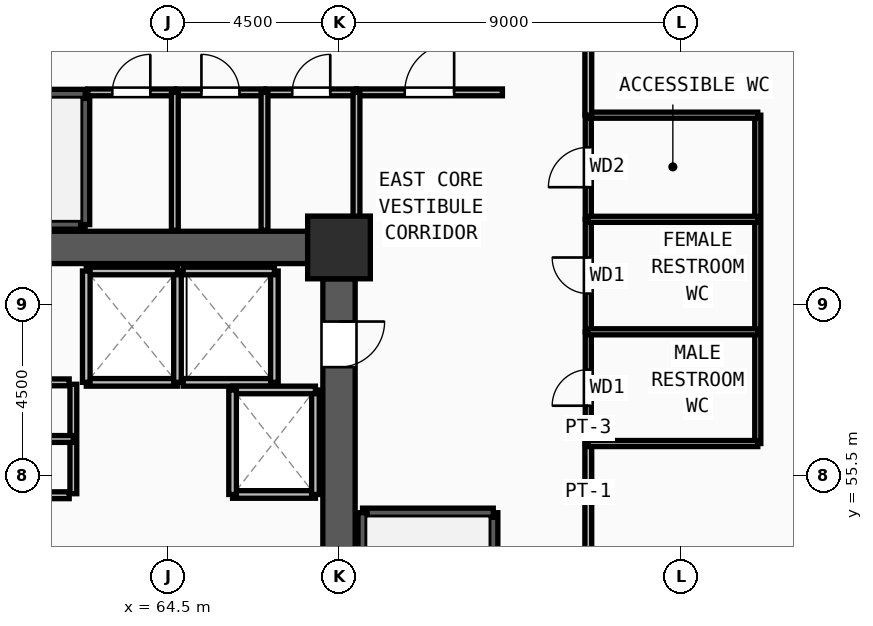
"""IFC4 building model, lengths in metres.
Left out: names, types, materials, properties, quantities, classifications, styles, units other than length and angle.
Written with IfcOpenShell. Run it as: python <this file> out.ifc"""

import sys

from ifc_helpers import new_model, si_unit, direction, frame, frame_2d, origin, origin_2d, place, context, subcontext, project, spatial, rectangle, extrude, source, transform, mapped, element, fill, save


model = new_model("IFC4")
c1 = context("Model", 3, precision=1e-05, world=origin(), true_north=direction((0.0, 1.0)))
c2 = subcontext(c1, "Body", "Model", "MODEL_VIEW")
j1 = project(units=[si_unit("LENGTHUNIT", "METRE"), si_unit("PLANEANGLEUNIT", "RADIAN")], contexts=[c1])
p1 = place(None, origin())
s1 = spatial("IfcSite", under=j1, at=p1, CompositionType="ELEMENT")
p2 = place(p1, origin())
s2 = spatial("IfcBuilding", under=s1, at=p2, CompositionType="ELEMENT")
p3 = place(p2, frame((0.0, 0.0, 39.75)))
s3 = spatial("IfcBuildingStorey", under=s2, at=p3, CompositionType="ELEMENT", Elevation=39.75)
m1 = source(origin(), c2, "Body", "SweptSolid", [
    extrude(rectangle(XDim=1.65, YDim=1.65, at=origin_2d()), origin(), (0.0, 0.0, 1.0), 3.75),
])
p4 = place(p3, frame((69.0, 61.5, 0.0), z_axis=(0.0, 0.0, 1.0), x_axis=(1.0, 0.0, 0.0)))
e1 = element("IfcColumn", 1, at=p4, inside=s3, PredefinedType="COLUMN", context=c2, shape_type="MappedRepresentation", body=[
    mapped(m1, transform((0.0, 0.0, 0.0), x_axis=(1.0, 0.0, 0.0), y_axis=(0.0, 1.0, 0.0), z_axis=(0.0, 0.0, 1.0), scale=1.0)),
])
p5 = place(p3, frame((60.825, 61.5, 0.0), z_axis=(0.0, 0.0, 1.0), x_axis=(1.0, 0.0, 0.0)))
e2 = element("IfcWall", 2, at=p5, inside=s3, PredefinedType="SHEAR", context=c2, shape_type="SweptSolid", body=[
    extrude(rectangle(XDim=7.35, YDim=0.85, at=frame_2d((3.675, 0.0))), origin(), (0.0, 0.0, 1.0), 3.57),
])
p6 = place(p3, frame((69.0, 60.675, 0.0), z_axis=(0.0, 0.0, 1.0), x_axis=(0.0, -1.0, 0.0)))
e3 = element("IfcWall", 3, at=p6, inside=s3, PredefinedType="SHEAR", context=c2, shape_type="SweptSolid", body=[
    extrude(rectangle(XDim=13.35, YDim=0.85, at=frame_2d((6.675, 0.0))), origin(), (0.0, 0.0, 1.0), 3.57),
])
m2 = source(origin(), c2, "Body", "SweptSolid", [
    extrude(rectangle(XDim=1.2, YDim=2.2, at=frame_2d((0.6, 1.1))), frame((0.0, 0.435, 0.0), z_axis=(0.0, -1.0, 0.0), x_axis=(1.0, 0.0, 0.0)), (0.0, 0.0, 1.0), 0.87),
])
p7 = place(p6, frame((1.125, 0.0, 0.0)))
e4 = element("IfcOpeningElement", 4, at=p7, cuts=e3, PredefinedType="OPENING", context=c2, shape_type="MappedRepresentation", body=[
    mapped(m2, transform((0.0, 0.0, 0.0), x_axis=(1.0, 0.0, 0.0), y_axis=(0.0, 1.0, 0.0), z_axis=(0.0, 0.0, 1.0), scale=1.0)),
])
p8 = place(p3, frame((73.06, 46.7, 0.0), z_axis=(0.0, 0.0, 1.0), x_axis=(0.0, 1.0, 0.0)))
e5 = element("IfcWall", 5, at=p8, inside=s3, PredefinedType="SOLIDWALL", context=c2, shape_type="SweptSolid", body=[
    extrude(rectangle(XDim=7.82, YDim=0.24, at=frame_2d((3.91, 0.0))), origin(), (0.0, 0.0, 1.0), 3.57),
])
m3 = source(origin(), c2, "Body", "SweptSolid", [
    extrude(rectangle(XDim=1.2, YDim=2.2, at=frame_2d((0.6, 1.1))), frame((0.0, 0.13, 0.0), z_axis=(0.0, -1.0, 0.0), x_axis=(1.0, 0.0, 0.0)), (0.0, 0.0, 1.0), 0.26),
])
p9 = place(p8, frame((0.32, 0.0, 0.0)))
e6 = element("IfcOpeningElement", 6, at=p9, cuts=e5, PredefinedType="OPENING", context=c2, shape_type="MappedRepresentation", body=[
    mapped(m3, transform((0.0, 0.0, 0.0), x_axis=(1.0, 0.0, 0.0), y_axis=(0.0, 1.0, 0.0), z_axis=(0.0, 0.0, 1.0), scale=1.0)),
])
p10 = place(p3, frame((73.06, 54.52, 0.0), z_axis=(0.0, 0.0, 1.0), x_axis=(-1.0, 0.0, 0.0)))
e7 = element("IfcWall", 7, at=p10, inside=s3, PredefinedType="SOLIDWALL", context=c2, shape_type="SweptSolid", body=[
    extrude(rectangle(XDim=3.44, YDim=0.24, at=frame_2d((1.72, 0.0))), origin(), (0.0, 0.0, 1.0), 3.57),
])
for number, where, z_axis, x_axis in (
    (8, (69.62, 54.52, 0.0), (0.0, 0.0, 1.0), (0.0, -1.0, 0.0)),
    (9, (54.5, 62.1, 0.0), (0.0, 0.0, 1.0), (1.0, 0.0, 0.0)),
):
    element("IfcWall", number, at=place(p3, frame(where, z_axis=z_axis, x_axis=x_axis)), inside=s3, PredefinedType="SOLIDWALL", context=c2, shape_type="SweptSolid", body=[
        extrude(rectangle(XDim=7.82, YDim=0.24, at=frame_2d((3.91, 0.0))), origin(), (0.0, 0.0, 1.0), 3.57),
    ])
p11 = place(p3, frame((62.32, 62.1, 0.0), z_axis=(0.0, 0.0, 1.0), x_axis=(0.0, 1.0, 0.0)))
e10 = element("IfcWall", 10, at=p11, inside=s3, PredefinedType="SOLIDWALL", context=c2, shape_type="SweptSolid", body=[
    extrude(rectangle(XDim=3.44, YDim=0.24, at=frame_2d((1.72, 0.0))), origin(), (0.0, 0.0, 1.0), 3.57),
])
p12 = place(p3, frame((62.32, 65.54, 0.0), z_axis=(0.0, 0.0, 1.0), x_axis=(-1.0, 0.0, 0.0)))
e11 = element("IfcWall", 11, at=p12, inside=s3, PredefinedType="SOLIDWALL", context=c2, shape_type="SweptSolid", body=[
    extrude(rectangle(XDim=7.82, YDim=0.24, at=frame_2d((3.91, 0.0))), origin(), (0.0, 0.0, 1.0), 3.57),
])
p13 = place(p12, frame((6.3, 0.0, 0.0)))
e12 = element("IfcOpeningElement", 12, at=p13, cuts=e11, PredefinedType="OPENING", context=c2, shape_type="MappedRepresentation", body=[
    mapped(m3, transform((0.0, 0.0, 0.0), x_axis=(1.0, 0.0, 0.0), y_axis=(0.0, 1.0, 0.0), z_axis=(0.0, 0.0, 1.0), scale=1.0)),
])
p14 = place(p3, frame((62.35, 57.95, 0.0), z_axis=(0.0, 0.0, 1.0), x_axis=(1.0, 0.0, 0.0)))
e13 = element("IfcWall", 13, at=p14, inside=s3, PredefinedType="SOLIDWALL", context=c2, shape_type="SweptSolid", body=[
    extrude(rectangle(XDim=2.4, YDim=0.2, at=frame_2d((1.2, 0.0))), origin(), (0.0, 0.0, 1.0), 3.57),
])
p15 = place(p3, frame((64.75, 57.95, 0.0), z_axis=(0.0, 0.0, 1.0), x_axis=(0.0, 1.0, 0.0)))
e14 = element("IfcWall", 14, at=p15, inside=s3, PredefinedType="SOLIDWALL", context=c2, shape_type="SweptSolid", body=[
    extrude(rectangle(XDim=2.93, YDim=0.2, at=frame_2d((1.465, 0.0))), origin(), (0.0, 0.0, 1.0), 3.57),
])
p16 = place(p3, frame((64.75, 60.88, 0.0), z_axis=(0.0, 0.0, 1.0), x_axis=(-1.0, 0.0, 0.0)))
e15 = element("IfcWall", 15, at=p16, inside=s3, PredefinedType="SOLIDWALL", context=c2, shape_type="SweptSolid", body=[
    extrude(rectangle(XDim=2.4, YDim=0.2, at=frame_2d((1.2, 0.0))), origin(), (0.0, 0.0, 1.0), 3.57),
])
p17 = place(p3, frame((62.35, 60.88, 0.0), z_axis=(0.0, 0.0, 1.0), x_axis=(0.0, -1.0, 0.0)))
e16 = element("IfcWall", 16, at=p17, inside=s3, PredefinedType="SOLIDWALL", context=c2, shape_type="SweptSolid", body=[
    extrude(rectangle(XDim=2.93, YDim=0.2, at=frame_2d((1.465, 0.0))), origin(), (0.0, 0.0, 1.0), 3.57),
])
p18 = place(p3, frame((64.9, 57.95, 0.0), z_axis=(0.0, 0.0, 1.0), x_axis=(1.0, 0.0, 0.0)))
e17 = element("IfcWall", 17, at=p18, inside=s3, PredefinedType="SOLIDWALL", context=c2, shape_type="SweptSolid", body=[
    extrude(rectangle(XDim=2.4, YDim=0.2, at=frame_2d((1.2, 0.0))), origin(), (0.0, 0.0, 1.0), 3.57),
])
p19 = place(p3, frame((67.3, 57.95, 0.0), z_axis=(0.0, 0.0, 1.0), x_axis=(0.0, 1.0, 0.0)))
e18 = element("IfcWall", 18, at=p19, inside=s3, PredefinedType="SOLIDWALL", context=c2, shape_type="SweptSolid", body=[
    extrude(rectangle(XDim=2.93, YDim=0.2, at=frame_2d((1.465, 0.0))), origin(), (0.0, 0.0, 1.0), 3.57),
])
p20 = place(p3, frame((67.3, 60.88, 0.0), z_axis=(0.0, 0.0, 1.0), x_axis=(-1.0, 0.0, 0.0)))
e19 = element("IfcWall", 19, at=p20, inside=s3, PredefinedType="SOLIDWALL", context=c2, shape_type="SweptSolid", body=[
    extrude(rectangle(XDim=2.4, YDim=0.2, at=frame_2d((1.2, 0.0))), origin(), (0.0, 0.0, 1.0), 3.57),
])
p21 = place(p3, frame((66.2, 55.0, 0.0), z_axis=(0.0, 0.0, 1.0), x_axis=(1.0, 0.0, 0.0)))
e20 = element("IfcWall", 20, at=p21, inside=s3, PredefinedType="SOLIDWALL", context=c2, shape_type="SweptSolid", body=[
    extrude(rectangle(XDim=2.18, YDim=0.2, at=frame_2d((1.09, 0.0))), origin(), (0.0, 0.0, 1.0), 3.57),
])
p22 = place(p3, frame((68.38, 55.0, 0.0), z_axis=(0.0, 0.0, 1.0), x_axis=(0.0, 1.0, 0.0)))
e21 = element("IfcWall", 21, at=p22, inside=s3, PredefinedType="SOLIDWALL", context=c2, shape_type="SweptSolid", body=[
    extrude(rectangle(XDim=2.75, YDim=0.2, at=frame_2d((1.375, 0.0))), origin(), (0.0, 0.0, 1.0), 3.57),
])
p23 = place(p3, frame((68.38, 57.75, 0.0), z_axis=(0.0, 0.0, 1.0), x_axis=(-1.0, 0.0, 0.0)))
e22 = element("IfcWall", 22, at=p23, inside=s3, PredefinedType="SOLIDWALL", context=c2, shape_type="SweptSolid", body=[
    extrude(rectangle(XDim=2.18, YDim=0.2, at=frame_2d((1.09, 0.0))), origin(), (0.0, 0.0, 1.0), 3.57),
])
p24 = place(p3, frame((66.2, 57.75, 0.0), z_axis=(0.0, 0.0, 1.0), x_axis=(0.0, -1.0, 0.0)))
e23 = element("IfcWall", 23, at=p24, inside=s3, PredefinedType="SOLIDWALL", context=c2, shape_type="SweptSolid", body=[
    extrude(rectangle(XDim=2.75, YDim=0.2, at=frame_2d((1.375, 0.0))), origin(), (0.0, 0.0, 1.0), 3.57),
])
p25 = place(p3, frame((59.84, 54.98, 0.0), z_axis=(0.0, 0.0, 1.0), x_axis=(1.0, 0.0, 0.0)))
e24 = element("IfcWall", 24, at=p25, inside=s3, PredefinedType="PARTITIONING", context=c2, shape_type="SweptSolid", body=[
    extrude(rectangle(XDim=2.06, YDim=0.18, at=frame_2d((1.03, 0.0))), origin(), (0.0, 0.0, 1.0), 3.57),
])
m4 = source(origin(), c2, "Body", "SweptSolid", [
    extrude(rectangle(XDim=0.85, YDim=2.1, at=frame_2d((0.425, 1.05))), frame((0.0, 0.1, 0.0), z_axis=(0.0, -1.0, 0.0), x_axis=(1.0, 0.0, 0.0)), (0.0, 0.0, 1.0), 0.2),
])
p26 = place(p25, frame((0.605, 0.0, 0.0)))
e25 = element("IfcOpeningElement", 25, at=p26, cuts=e24, PredefinedType="OPENING", context=c2, shape_type="MappedRepresentation", body=[
    mapped(m4, transform((0.0, 0.0, 0.0), x_axis=(1.0, 0.0, 0.0), y_axis=(0.0, 1.0, 0.0), z_axis=(0.0, 0.0, 1.0), scale=1.0)),
])
p27 = place(p3, frame((59.84, 57.95, 0.0), z_axis=(0.0, 0.0, 1.0), x_axis=(1.0, 0.0, 0.0)))
e26 = element("IfcWall", 26, at=p27, inside=s3, PredefinedType="PARTITIONING", context=c2, shape_type="SweptSolid", body=[
    extrude(rectangle(XDim=2.06, YDim=0.18, at=frame_2d((1.03, 0.0))), origin(), (0.0, 0.0, 1.0), 3.57),
])
p28 = place(p27, frame((0.605, 0.0, 0.0)))
e27 = element("IfcOpeningElement", 27, at=p28, cuts=e26, PredefinedType="OPENING", context=c2, shape_type="MappedRepresentation", body=[
    mapped(m4, transform((0.0, 0.0, 0.0), x_axis=(1.0, 0.0, 0.0), y_axis=(0.0, 1.0, 0.0), z_axis=(0.0, 0.0, 1.0), scale=1.0)),
])
p29 = place(p3, frame((75.56, 56.34, 0.0), z_axis=(0.0, 0.0, 1.0), x_axis=(0.0, 1.0, 0.0)))
e28 = element("IfcWall", 28, at=p29, inside=s3, PredefinedType="PARTITIONING", context=c2, shape_type="SweptSolid", body=[
    extrude(rectangle(XDim=2.94, YDim=0.16, at=frame_2d((1.47, 0.0))), origin(), (0.0, 0.0, 1.0), 3.57),
])
m5 = source(origin(), c2, "Body", "SweptSolid", [
    extrude(rectangle(XDim=0.95, YDim=2.15, at=frame_2d((0.475, 1.075))), frame((0.0, 0.09, 0.0), z_axis=(0.0, -1.0, 0.0), x_axis=(1.0, 0.0, 0.0)), (0.0, 0.0, 1.0), 0.18),
])
p30 = place(p29, frame((0.995, 0.0, 0.0)))
e29 = element("IfcOpeningElement", 29, at=p30, cuts=e28, PredefinedType="OPENING", context=c2, shape_type="MappedRepresentation", body=[
    mapped(m5, transform((0.0, 0.0, 0.0), x_axis=(1.0, 0.0, 0.0), y_axis=(0.0, 1.0, 0.0), z_axis=(0.0, 0.0, 1.0), scale=1.0)),
])
p31 = place(p3, frame((75.56, 59.28, 0.0), z_axis=(0.0, 0.0, 1.0), x_axis=(0.0, 1.0, 0.0)))
e30 = element("IfcWall", 30, at=p31, inside=s3, PredefinedType="PARTITIONING", context=c2, shape_type="SweptSolid", body=[
    extrude(rectangle(XDim=2.96, YDim=0.16, at=frame_2d((1.48, 0.0))), origin(), (0.0, 0.0, 1.0), 3.57),
])
p32 = place(p31, frame((1.005, 0.0, 0.0)))
e31 = element("IfcOpeningElement", 31, at=p32, cuts=e30, PredefinedType="OPENING", context=c2, shape_type="MappedRepresentation", body=[
    mapped(m5, transform((0.0, 0.0, 0.0), x_axis=(1.0, 0.0, 0.0), y_axis=(0.0, 1.0, 0.0), z_axis=(0.0, 0.0, 1.0), scale=1.0)),
])
p33 = place(p3, frame((75.56, 62.24, 0.0), z_axis=(0.0, 0.0, 1.0), x_axis=(0.0, 1.0, 0.0)))
e32 = element("IfcWall", 32, at=p33, inside=s3, PredefinedType="PARTITIONING", context=c2, shape_type="SweptSolid", body=[
    extrude(rectangle(XDim=2.74, YDim=0.16, at=frame_2d((1.37, 0.0))), origin(), (0.0, 0.0, 1.0), 3.57),
])
m6 = source(origin(), c2, "Body", "SweptSolid", [
    extrude(rectangle(XDim=1.05, YDim=2.15, at=frame_2d((0.525, 1.075))), frame((0.0, 0.09, 0.0), z_axis=(0.0, -1.0, 0.0), x_axis=(1.0, 0.0, 0.0)), (0.0, 0.0, 1.0), 0.18),
])
p34 = place(p33, frame((0.845, 0.0, 0.0)))
e33 = element("IfcOpeningElement", 33, at=p34, cuts=e32, PredefinedType="OPENING", context=c2, shape_type="MappedRepresentation", body=[
    mapped(m6, transform((0.0, 0.0, 0.0), x_axis=(1.0, 0.0, 0.0), y_axis=(0.0, 1.0, 0.0), z_axis=(0.0, 0.0, 1.0), scale=1.0)),
])
p35 = place(p3, frame((62.39, 65.58, 0.0), z_axis=(0.0, 0.0, 1.0), x_axis=(1.0, 0.0, 0.0)))
e34 = element("IfcWall", 34, at=p35, inside=s3, PredefinedType="PARTITIONING", context=c2, shape_type="SweptSolid", body=[
    extrude(rectangle(XDim=2.29, YDim=0.18, at=frame_2d((1.145, 0.0))), origin(), (0.0, 0.0, 1.0), 3.57),
])
m7 = source(origin(), c2, "Body", "SweptSolid", [
    extrude(rectangle(XDim=1.0, YDim=2.2, at=frame_2d((0.5, 1.1))), frame((0.0, 0.1, 0.0), z_axis=(0.0, -1.0, 0.0), x_axis=(1.0, 0.0, 0.0)), (0.0, 0.0, 1.0), 0.2),
])
p36 = place(p35, frame((0.645, 0.0, 0.0)))
e35 = element("IfcOpeningElement", 35, at=p36, cuts=e34, PredefinedType="OPENING", context=c2, shape_type="MappedRepresentation", body=[
    mapped(m7, transform((0.0, 0.0, 0.0), x_axis=(1.0, 0.0, 0.0), y_axis=(0.0, 1.0, 0.0), z_axis=(0.0, 0.0, 1.0), scale=1.0)),
])
p37 = place(p3, frame((64.72, 65.58, 0.0), z_axis=(0.0, 0.0, 1.0), x_axis=(1.0, 0.0, 0.0)))
e36 = element("IfcWall", 36, at=p37, inside=s3, PredefinedType="PARTITIONING", context=c2, shape_type="SweptSolid", body=[
    extrude(rectangle(XDim=2.32, YDim=0.18, at=frame_2d((1.16, 0.0))), origin(), (0.0, 0.0, 1.0), 3.57),
])
p38 = place(p37, frame((0.66, 0.0, 0.0)))
e37 = element("IfcOpeningElement", 37, at=p38, cuts=e36, PredefinedType="OPENING", context=c2, shape_type="MappedRepresentation", body=[
    mapped(m7, transform((0.0, 0.0, 0.0), x_axis=(1.0, 0.0, 0.0), y_axis=(0.0, 1.0, 0.0), z_axis=(0.0, 0.0, 1.0), scale=1.0)),
])
p39 = place(p3, frame((67.08, 65.58, 0.0), z_axis=(0.0, 0.0, 1.0), x_axis=(1.0, 0.0, 0.0)))
e38 = element("IfcWall", 38, at=p39, inside=s3, PredefinedType="PARTITIONING", context=c2, shape_type="SweptSolid", body=[
    extrude(rectangle(XDim=2.38, YDim=0.18, at=frame_2d((1.19, 0.0))), origin(), (0.0, 0.0, 1.0), 3.57),
])
p40 = place(p39, frame((0.69, 0.0, 0.0)))
e39 = element("IfcOpeningElement", 39, at=p40, cuts=e38, PredefinedType="OPENING", context=c2, shape_type="MappedRepresentation", body=[
    mapped(m7, transform((0.0, 0.0, 0.0), x_axis=(1.0, 0.0, 0.0), y_axis=(0.0, 1.0, 0.0), z_axis=(0.0, 0.0, 1.0), scale=1.0)),
])
p41 = place(p3, frame((69.46, 65.58, 0.0), z_axis=(0.0, 0.0, 1.0), x_axis=(1.0, 0.0, 0.0)))
e40 = element("IfcWall", 40, at=p41, inside=s3, PredefinedType="PARTITIONING", context=c2, shape_type="SweptSolid", body=[
    extrude(rectangle(XDim=3.84, YDim=0.18, at=frame_2d((1.92, 0.0))), origin(), (0.0, 0.0, 1.0), 3.57),
])
m8 = source(origin(), c2, "Body", "SweptSolid", [
    extrude(rectangle(XDim=1.3, YDim=2.2, at=frame_2d((0.65, 1.1))), frame((0.0, 0.1, 0.0), z_axis=(0.0, -1.0, 0.0), x_axis=(1.0, 0.0, 0.0)), (0.0, 0.0, 1.0), 0.2),
])
p42 = place(p41, frame((1.27, 0.0, 0.0)))
e41 = element("IfcOpeningElement", 41, at=p42, cuts=e40, PredefinedType="OPENING", context=c2, shape_type="MappedRepresentation", body=[
    mapped(m8, transform((0.0, 0.0, 0.0), x_axis=(1.0, 0.0, 0.0), y_axis=(0.0, 1.0, 0.0), z_axis=(0.0, 0.0, 1.0), scale=1.0)),
])
p43 = place(p3, frame((75.56, 56.34, 0.0), z_axis=(0.0, 0.0, 1.0), x_axis=(0.0, -1.0, 0.0)))
e42 = element("IfcWall", 42, at=p43, inside=s3, PredefinedType="PARTITIONING", context=c2, shape_type="SweptSolid", body=[
    extrude(rectangle(XDim=7.055, YDim=0.18, at=frame_2d((3.528, 0.0))), origin(), (0.0, 0.0, 1.0), 3.57),
])
m9 = source(origin(), c2, "Body", "SweptSolid", [
    extrude(rectangle(XDim=1.5, YDim=2.2, at=frame_2d((0.75, 1.1))), frame((0.0, 0.1, 0.0), z_axis=(0.0, -1.0, 0.0), x_axis=(1.0, 0.0, 0.0)), (0.0, 0.0, 1.0), 0.2),
])
p44 = place(p43, frame((2.778, 0.0, 0.0)))
e43 = element("IfcOpeningElement", 43, at=p44, cuts=e42, PredefinedType="OPENING", context=c2, shape_type="MappedRepresentation", body=[
    mapped(m9, transform((0.0, 0.0, 0.0), x_axis=(1.0, 0.0, 0.0), y_axis=(0.0, 1.0, 0.0), z_axis=(0.0, 0.0, 1.0), scale=1.0)),
])
p45 = place(p3, frame((62.01, 55.02, 0.0), z_axis=(0.0, 0.0, 1.0), x_axis=(0.0, 1.0, 0.0)))
e44 = element("IfcWall", 44, at=p45, inside=s3, PredefinedType="PARTITIONING", context=c2, shape_type="SweptSolid", body=[
    extrude(rectangle(XDim=2.88, YDim=0.18, at=frame_2d((1.44, 0.0))), origin(), (0.0, 0.0, 1.0), 3.57),
])
p46 = place(p3, frame((59.72, 56.46, 0.0), z_axis=(0.0, 0.0, 1.0), x_axis=(1.0, 0.0, 0.0)))
e45 = element("IfcWall", 45, at=p46, inside=s3, PredefinedType="PARTITIONING", context=c2, shape_type="SweptSolid", body=[
    extrude(rectangle(XDim=2.29, YDim=0.18, at=frame_2d((1.145, 0.0))), origin(), (0.0, 0.0, 1.0), 3.57),
])
p47 = place(p3, frame((80.02, 56.34, 0.0), z_axis=(0.0, 0.0, 1.0), x_axis=(0.0, 1.0, 0.0)))
e46 = element("IfcWall", 46, at=p47, inside=s3, PredefinedType="PARTITIONING", context=c2, shape_type="SweptSolid", body=[
    extrude(rectangle(XDim=8.64, YDim=0.16, at=frame_2d((4.32, 0.0))), origin(), (0.0, 0.0, 1.0), 3.57),
])
for number, where, z_axis, x_axis in (
    (47, (75.56, 56.34, 0.0), (0.0, 0.0, 1.0), (1.0, 0.0, 0.0)),
    (48, (75.56, 59.28, 0.0), (0.0, 0.0, 1.0), (1.0, 0.0, 0.0)),
    (49, (75.56, 62.24, 0.0), (0.0, 0.0, 1.0), (1.0, 0.0, 0.0)),
    (50, (75.56, 64.98, 0.0), (0.0, 0.0, 1.0), (1.0, 0.0, 0.0)),
):
    element("IfcWall", number, at=place(p3, frame(where, z_axis=z_axis, x_axis=x_axis)), inside=s3, PredefinedType="PARTITIONING", context=c2, shape_type="SweptSolid", body=[
        extrude(rectangle(XDim=4.46, YDim=0.16, at=frame_2d((2.23, 0.0))), origin(), (0.0, 0.0, 1.0), 3.57),
    ])
for number, where, z_axis, x_axis in (
    (51, (64.68, 61.95, 0.0), (0.0, 0.0, 1.0), (0.0, 1.0, 0.0)),
    (52, (67.04, 61.95, 0.0), (0.0, 0.0, 1.0), (0.0, 1.0, 0.0)),
    (53, (69.46, 61.95, 0.0), (0.0, 0.0, 1.0), (0.0, 1.0, 0.0)),
):
    element("IfcWall", number, at=place(p3, frame(where, z_axis=z_axis, x_axis=x_axis)), inside=s3, PredefinedType="PARTITIONING", context=c2, shape_type="SweptSolid", body=[
        extrude(rectangle(XDim=3.63, YDim=0.18, at=frame_2d((1.815, 0.0))), origin(), (0.0, 0.0, 1.0), 3.57),
    ])
p48 = place(p3, frame((75.56, 67.215, 0.0), z_axis=(0.0, 0.0, 1.0), x_axis=(0.0, -1.0, 0.0)))
e54 = element("IfcWall", 54, at=p48, inside=s3, PredefinedType="PARTITIONING", context=c2, shape_type="SweptSolid", body=[
    extrude(rectangle(XDim=2.235, YDim=0.18, at=frame_2d((1.118, 0.0))), origin(), (0.0, 0.0, 1.0), 3.57),
])
m10 = source(origin(), c2, "Body", "SweptSolid", [
    extrude(rectangle(XDim=1.2, YDim=2.2, at=frame_2d((0.6, 1.1))), frame((0.0, 0.025, 0.0), z_axis=(0.0, -1.0, 0.0), x_axis=(1.0, 0.0, 0.0)), (0.0, 0.0, 1.0), 0.05),
])
p49 = place(p7, origin())
e55 = element("IfcDoor", 55, at=p49, inside=s3, OperationType="SINGLE_SWING_LEFT", PredefinedType="DOOR", context=c2, shape_type="MappedRepresentation", body=[
    mapped(m10, transform((0.0, 0.0, 0.0), x_axis=(1.0, 0.0, 0.0), y_axis=(0.0, 1.0, 0.0), z_axis=(0.0, 0.0, 1.0), scale=1.0)),
])
fill(e4, e55)
m11 = source(origin(), c2, "Body", "SweptSolid", [
    extrude(rectangle(XDim=0.95, YDim=2.15, at=frame_2d((0.475, 1.075))), frame((0.0, 0.025, 0.0), z_axis=(0.0, -1.0, 0.0), x_axis=(1.0, 0.0, 0.0)), (0.0, 0.0, 1.0), 0.05),
])
p50 = place(p30, origin())
e56 = element("IfcDoor", 56, at=p50, inside=s3, OperationType="SINGLE_SWING_LEFT", PredefinedType="DOOR", context=c2, shape_type="MappedRepresentation", body=[
    mapped(m11, transform((0.0, 0.0, 0.0), x_axis=(1.0, 0.0, 0.0), y_axis=(0.0, 1.0, 0.0), z_axis=(0.0, 0.0, 1.0), scale=1.0)),
])
fill(e29, e56)
p51 = place(p32, origin())
e57 = element("IfcDoor", 57, at=p51, inside=s3, OperationType="SINGLE_SWING_RIGHT", PredefinedType="DOOR", context=c2, shape_type="MappedRepresentation", body=[
    mapped(m11, transform((0.0, 0.0, 0.0), x_axis=(1.0, 0.0, 0.0), y_axis=(0.0, 1.0, 0.0), z_axis=(0.0, 0.0, 1.0), scale=1.0)),
])
fill(e31, e57)
m12 = source(origin(), c2, "Body", "SweptSolid", [
    extrude(rectangle(XDim=1.05, YDim=2.15, at=frame_2d((0.525, 1.075))), frame((0.0, 0.025, 0.0), z_axis=(0.0, -1.0, 0.0), x_axis=(1.0, 0.0, 0.0)), (0.0, 0.0, 1.0), 0.05),
])
p52 = place(p34, origin())
e58 = element("IfcDoor", 58, at=p52, inside=s3, OperationType="SINGLE_SWING_LEFT", PredefinedType="DOOR", context=c2, shape_type="MappedRepresentation", body=[
    mapped(m12, transform((0.0, 0.0, 0.0), x_axis=(1.0, 0.0, 0.0), y_axis=(0.0, 1.0, 0.0), z_axis=(0.0, 0.0, 1.0), scale=1.0)),
])
fill(e33, e58)
m13 = source(origin(), c2, "Body", "SweptSolid", [
    extrude(rectangle(XDim=1.0, YDim=2.2, at=frame_2d((0.5, 1.1))), frame((0.0, 0.025, 0.0), z_axis=(0.0, -1.0, 0.0), x_axis=(1.0, 0.0, 0.0)), (0.0, 0.0, 1.0), 0.05),
])
p53 = place(p36, origin())
e59 = element("IfcDoor", 59, at=p53, inside=s3, OperationType="SINGLE_SWING_RIGHT", PredefinedType="DOOR", context=c2, shape_type="MappedRepresentation", body=[
    mapped(m13, transform((0.0, 0.0, 0.0), x_axis=(1.0, 0.0, 0.0), y_axis=(0.0, 1.0, 0.0), z_axis=(0.0, 0.0, 1.0), scale=1.0)),
])
fill(e35, e59)
p54 = place(p38, origin())
e60 = element("IfcDoor", 60, at=p54, inside=s3, OperationType="SINGLE_SWING_LEFT", PredefinedType="DOOR", context=c2, shape_type="MappedRepresentation", body=[
    mapped(m13, transform((0.0, 0.0, 0.0), x_axis=(1.0, 0.0, 0.0), y_axis=(0.0, 1.0, 0.0), z_axis=(0.0, 0.0, 1.0), scale=1.0)),
])
fill(e37, e60)
p55 = place(p40, origin())
e61 = element("IfcDoor", 61, at=p55, inside=s3, OperationType="SINGLE_SWING_RIGHT", PredefinedType="DOOR", context=c2, shape_type="MappedRepresentation", body=[
    mapped(m13, transform((0.0, 0.0, 0.0), x_axis=(1.0, 0.0, 0.0), y_axis=(0.0, 1.0, 0.0), z_axis=(0.0, 0.0, 1.0), scale=1.0)),
])
fill(e39, e61)
m14 = source(origin(), c2, "Body", "SweptSolid", [
    extrude(rectangle(XDim=1.3, YDim=2.2, at=frame_2d((0.65, 1.1))), frame((0.0, 0.025, 0.0), z_axis=(0.0, -1.0, 0.0), x_axis=(1.0, 0.0, 0.0)), (0.0, 0.0, 1.0), 0.05),
])
p56 = place(p42, origin())
e62 = element("IfcDoor", 62, at=p56, inside=s3, OperationType="SINGLE_SWING_RIGHT", PredefinedType="DOOR", context=c2, shape_type="MappedRepresentation", body=[
    mapped(m14, transform((0.0, 0.0, 0.0), x_axis=(1.0, 0.0, 0.0), y_axis=(0.0, 1.0, 0.0), z_axis=(0.0, 0.0, 1.0), scale=1.0)),
])
fill(e41, e62)
save(model, sys.argv[1])
